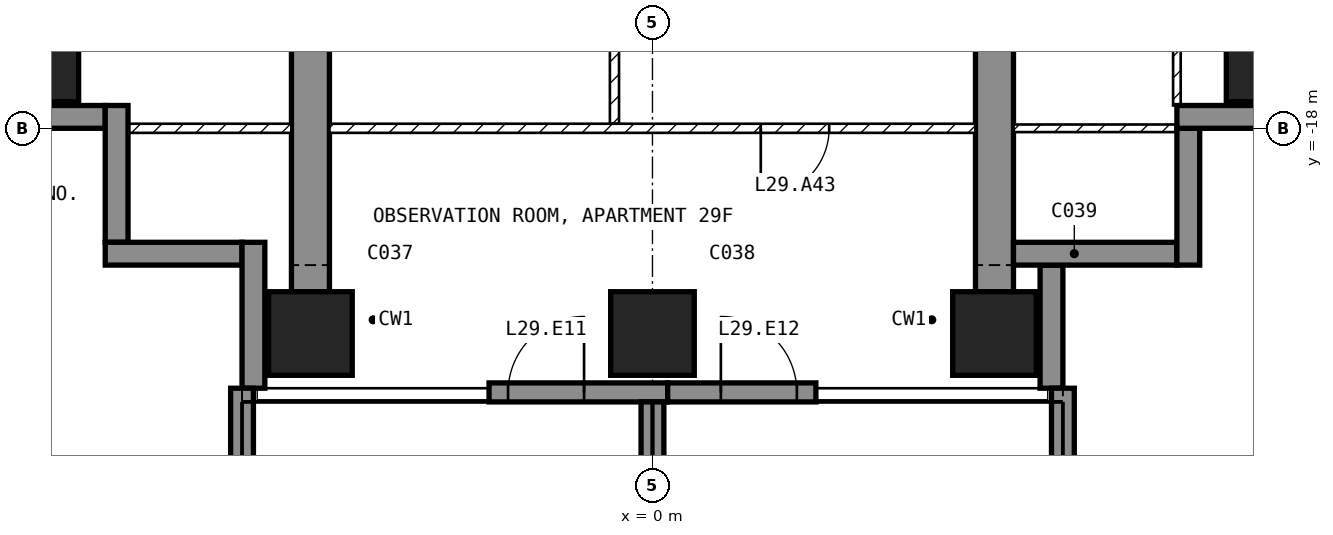
"""IFC4 building model, lengths in metres.
Left out: names, types, materials, properties, quantities, classifications, styles, units other than length and angle.
Written with IfcOpenShell. Run it as: python <this file> out.ifc"""

import sys

from ifc_helpers import new_model, si_unit, direction, frame, frame_2d, origin, origin_2d, place, context, subcontext, project, spatial, polyline, rectangle, outline, extrude, element, fill, save


model = new_model("IFC4")
c1 = context("Model", 3, precision=1e-05, world=origin(), true_north=direction((0.0, 1.0)))
c2 = subcontext(c1, "Body", "Model", "MODEL_VIEW")
j1 = project(units=[si_unit("LENGTHUNIT", "METRE"), si_unit("PLANEANGLEUNIT", "RADIAN")], contexts=[c1])
p1 = place(None, origin())
s1 = spatial("IfcSite", under=j1, at=p1, CompositionType="ELEMENT")
p2 = place(p1, origin())
s2 = spatial("IfcBuilding", under=s1, at=p2, CompositionType="ELEMENT")
p3 = place(p2, frame((0.0, 0.0, 123.4)))
s3 = spatial("IfcBuildingStorey", under=s2, at=p3, CompositionType="ELEMENT", Elevation=123.4)
for number, where, z_axis, x_axis in (
    (1, (-8.1, -17.1, -0.25), (0.0, 0.0, 1.0), (1.0, 0.0, 0.0)),
    (2, (-4.5, -20.7, -0.25), (0.0, 0.0, 1.0), (1.0, 0.0, 0.0)),
    (3, (0.0, -20.7, -0.25), (0.0, 0.0, 1.0), (1.0, 0.0, 0.0)),
    (4, (4.5, -20.7, -0.25), (0.0, 0.0, 1.0), (1.0, 0.0, 0.0)),
    (5, (8.1, -17.1, -0.25), (0.0, 0.0, 1.0), (1.0, 0.0, 0.0)),
):
    element("IfcColumn", number, at=place(p3, frame(where, z_axis=z_axis, x_axis=x_axis)), inside=s3, PredefinedType="COLUMN", context=c2, shape_type="SweptSolid", body=[
        extrude(rectangle(XDim=1.1, YDim=1.1, at=origin_2d()), origin(), (0.0, 0.0, 1.0), 3.5),
    ])
for number, where, z_axis, x_axis in (
    (6, (-4.75, -20.15, -0.25), (1.0, 0.0, 0.0), (0.0, 1.0, 0.0)),
    (7, (4.25, -20.15, -0.25), (1.0, 0.0, 0.0), (0.0, 1.0, 0.0)),
):
    element("IfcWall", number, at=place(p3, frame(where, z_axis=z_axis, x_axis=x_axis)), inside=s3, PredefinedType="SHEAR", context=c2, shape_type="SweptSolid", body=[
        extrude(outline(polyline([(0.0, 0.0), (6.65, 0.0), (6.65, 2.65), (9.05, 2.65), (9.05, 0.0), (11.15, 0.0), (11.15, 3.5), (0.0, 3.5), (0.0, 0.0)])), origin(), (0.0, 0.0, 1.0), 0.5),
    ])
p4 = place(p3, frame((-2.15, -21.475, 0.0), z_axis=(0.0, 0.0, 1.0), x_axis=(1.0, 0.0, 0.0)))
e8 = element("IfcWall", 8, at=p4, inside=s3, PredefinedType="SOLIDWALL", context=c2, shape_type="SweptSolid", body=[
    extrude(rectangle(XDim=2.35, YDim=0.25, at=frame_2d((1.175, 0.0))), origin(), (0.0, 0.0, 1.0), 3.25),
])
p5 = place(p4, frame((0.25, 0.0, 0.0)))
e9 = element("IfcOpeningElement", 9, at=p5, cuts=e8, PredefinedType="OPENING", context=c2, shape_type="SweptSolid", body=[
    extrude(rectangle(XDim=1.0, YDim=2.4, at=frame_2d((0.5, 1.2))), frame((0.0, 0.135, 0.0), z_axis=(0.0, -1.0, 0.0), x_axis=(1.0, 0.0, 0.0)), (0.0, 0.0, 1.0), 0.27),
])
p6 = place(p3, frame((0.2, -21.475, 0.0), z_axis=(0.0, 0.0, 1.0), x_axis=(1.0, 0.0, 0.0)))
e10 = element("IfcWall", 10, at=p6, inside=s3, PredefinedType="SOLIDWALL", context=c2, shape_type="SweptSolid", body=[
    extrude(rectangle(XDim=1.95, YDim=0.25, at=frame_2d((0.975, 0.0))), origin(), (0.0, 0.0, 1.0), 3.25),
])
p7 = place(p6, frame((0.7, 0.0, 0.0)))
e11 = element("IfcOpeningElement", 11, at=p7, cuts=e10, PredefinedType="OPENING", context=c2, shape_type="SweptSolid", body=[
    extrude(rectangle(XDim=1.0, YDim=2.4, at=frame_2d((0.5, 1.2))), frame((0.0, 0.135, 0.0), z_axis=(0.0, -1.0, 0.0), x_axis=(1.0, 0.0, 0.0)), (0.0, 0.0, 1.0), 0.27),
])
p8 = place(p3, frame((5.25, -21.42, 0.0), z_axis=(0.0, 0.0, 1.0), x_axis=(0.0, 1.0, 0.0)))
e12 = element("IfcWall", 12, at=p8, inside=s3, PredefinedType="SOLIDWALL", context=c2, shape_type="SweptSolid", body=[
    extrude(rectangle(XDim=1.62, YDim=0.3, at=frame_2d((0.81, 0.0))), origin(), (0.0, 0.0, 1.0), 3.25),
])
p9 = place(p3, frame((4.75, -19.65, 0.0), z_axis=(0.0, 0.0, 1.0), x_axis=(1.0, 0.0, 0.0)))
e13 = element("IfcWall", 13, at=p9, inside=s3, PredefinedType="SOLIDWALL", context=c2, shape_type="SweptSolid", body=[
    extrude(rectangle(XDim=2.15, YDim=0.3, at=frame_2d((1.075, 0.0))), origin(), (0.0, 0.0, 1.0), 3.25),
])
p10 = place(p3, frame((7.05, -19.8, 0.0), z_axis=(0.0, 0.0, 1.0), x_axis=(0.0, 1.0, 0.0)))
e14 = element("IfcWall", 14, at=p10, inside=s3, PredefinedType="SOLIDWALL", context=c2, shape_type="SweptSolid", body=[
    extrude(rectangle(XDim=1.8, YDim=0.3, at=frame_2d((0.9, 0.0))), origin(), (0.0, 0.0, 1.0), 3.25),
])
p11 = place(p3, frame((6.9, -17.85, 0.0), z_axis=(0.0, 0.0, 1.0), x_axis=(1.0, 0.0, 0.0)))
e15 = element("IfcWall", 15, at=p11, inside=s3, PredefinedType="SOLIDWALL", context=c2, shape_type="SweptSolid", body=[
    extrude(rectangle(XDim=1.85, YDim=0.3, at=frame_2d((0.925, 0.0))), origin(), (0.0, 0.0, 1.0), 3.25),
])
p12 = place(p3, frame((-8.75, -17.85, 0.0), z_axis=(0.0, 0.0, 1.0), x_axis=(1.0, 0.0, 0.0)))
e16 = element("IfcWall", 16, at=p12, inside=s3, PredefinedType="SOLIDWALL", context=c2, shape_type="SweptSolid", body=[
    extrude(rectangle(XDim=1.55, YDim=0.3, at=frame_2d((0.775, 0.0))), origin(), (0.0, 0.0, 1.0), 3.25),
])
for number, where, z_axis, x_axis in (
    (17, (-7.05, -17.7, 0.0), (0.0, 0.0, 1.0), (0.0, -1.0, 0.0)),
    (18, (-7.2, -19.65, 0.0), (0.0, 0.0, 1.0), (1.0, 0.0, 0.0)),
):
    element("IfcWall", number, at=place(p3, frame(where, z_axis=z_axis, x_axis=x_axis)), inside=s3, PredefinedType="SOLIDWALL", context=c2, shape_type="SweptSolid", body=[
        extrude(rectangle(XDim=1.8, YDim=0.3, at=frame_2d((0.9, 0.0))), origin(), (0.0, 0.0, 1.0), 3.25),
    ])
p13 = place(p3, frame((-5.25, -19.5, 0.0), z_axis=(0.0, 0.0, 1.0), x_axis=(0.0, -1.0, 0.0)))
e19 = element("IfcWall", 19, at=p13, inside=s3, PredefinedType="SOLIDWALL", context=c2, shape_type="SweptSolid", body=[
    extrude(rectangle(XDim=1.92, YDim=0.3, at=frame_2d((0.96, 0.0))), origin(), (0.0, 0.0, 1.0), 3.25),
])
p14 = place(p3, frame((-5.4, -21.42, 0.0), z_axis=(0.0, 0.0, 1.0), x_axis=(0.0, -1.0, 0.0)))
e20 = element("IfcWall", 20, at=p14, inside=s3, PredefinedType="SOLIDWALL", context=c2, shape_type="SweptSolid", body=[
    extrude(rectangle(XDim=2.88, YDim=0.3, at=frame_2d((1.44, 0.0))), origin(), (0.0, 0.0, 1.0), 3.25),
])
p15 = place(p3, frame((0.0, -21.6, 0.0), z_axis=(0.0, 0.0, 1.0), x_axis=(0.0, -1.0, 0.0)))
e21 = element("IfcWall", 21, at=p15, inside=s3, PredefinedType="SOLIDWALL", context=c2, shape_type="SweptSolid", body=[
    extrude(rectangle(XDim=2.7, YDim=0.3, at=frame_2d((1.35, 0.0))), origin(), (0.0, 0.0, 1.0), 3.25),
])
p16 = place(p3, frame((5.4, -21.42, 0.0), z_axis=(0.0, 0.0, 1.0), x_axis=(0.0, -1.0, 0.0)))
e22 = element("IfcWall", 22, at=p16, inside=s3, PredefinedType="SOLIDWALL", context=c2, shape_type="SweptSolid", body=[
    extrude(rectangle(XDim=2.88, YDim=0.3, at=frame_2d((1.44, 0.0))), origin(), (0.0, 0.0, 1.0), 3.25),
])
p17 = place(p3, frame((-0.5, -17.94, 0.0), z_axis=(0.0, 0.0, 1.0), x_axis=(0.0, 1.0, 0.0)))
e23 = element("IfcWall", 23, at=p17, inside=s3, PredefinedType="PARTITIONING", context=c2, shape_type="SweptSolid", body=[
    extrude(rectangle(XDim=2.88, YDim=0.12, at=frame_2d((1.44, 0.0))), origin(), (0.0, 0.0, 1.0), 3.25),
])
p18 = place(p17, frame((0.99, 0.0, 0.0)))
e24 = element("IfcOpeningElement", 24, at=p18, cuts=e23, PredefinedType="OPENING", context=c2, shape_type="SweptSolid", body=[
    extrude(rectangle(XDim=0.9, YDim=2.1, at=frame_2d((0.45, 1.05))), frame((0.0, 0.07, 0.0), z_axis=(0.0, -1.0, 0.0), x_axis=(1.0, 0.0, 0.0)), (0.0, 0.0, 1.0), 0.14),
])
p19 = place(p3, frame((4.25, -18.0, 0.0), z_axis=(0.0, 0.0, 1.0), x_axis=(-1.0, 0.0, 0.0)))
e25 = element("IfcWall", 25, at=p19, inside=s3, PredefinedType="PARTITIONING", context=c2, shape_type="SweptSolid", body=[
    extrude(rectangle(XDim=8.5, YDim=0.12, at=frame_2d((4.25, 0.0))), origin(), (0.0, 0.0, 1.0), 3.25),
])
p20 = place(p19, frame((1.925, 0.0, 0.0)))
e26 = element("IfcOpeningElement", 26, at=p20, cuts=e25, PredefinedType="OPENING", context=c2, shape_type="SweptSolid", body=[
    extrude(rectangle(XDim=0.9, YDim=2.1, at=frame_2d((0.45, 1.05))), frame((0.0, 0.07, 0.0), z_axis=(0.0, -1.0, 0.0), x_axis=(1.0, 0.0, 0.0)), (0.0, 0.0, 1.0), 0.14),
])
p21 = place(p3, frame((6.9, -17.7, 0.0), z_axis=(0.0, 0.0, 1.0), x_axis=(0.0, 1.0, 0.0)))
e27 = element("IfcWall", 27, at=p21, inside=s3, PredefinedType="PARTITIONING", context=c2, shape_type="SweptSolid", body=[
    extrude(rectangle(XDim=3.25, YDim=0.1, at=frame_2d((1.625, 0.0))), origin(), (0.0, 0.0, 1.0), 3.25),
])
p22 = place(p21, frame((2.2, 0.0, 0.0)))
e28 = element("IfcOpeningElement", 28, at=p22, cuts=e27, PredefinedType="OPENING", context=c2, shape_type="SweptSolid", body=[
    extrude(rectangle(XDim=0.85, YDim=2.1, at=frame_2d((0.425, 1.05))), frame((0.0, 0.06, 0.0), z_axis=(0.0, -1.0, 0.0), x_axis=(1.0, 0.0, 0.0)), (0.0, 0.0, 1.0), 0.12),
])
p23 = place(p3, frame((7.12, -18.0, 0.0), z_axis=(0.0, 0.0, 1.0), x_axis=(-1.0, 0.0, 0.0)))
e29 = element("IfcWall", 29, at=p23, inside=s3, PredefinedType="PARTITIONING", context=c2, shape_type="SweptSolid", body=[
    extrude(rectangle(XDim=2.37, YDim=0.1, at=frame_2d((1.185, 0.0))), origin(), (0.0, 0.0, 1.0), 3.25),
])
p24 = place(p3, frame((-4.75, -18.0, 0.0), z_axis=(0.0, 0.0, 1.0), x_axis=(-1.0, 0.0, 0.0)))
e30 = element("IfcWall", 30, at=p24, inside=s3, PredefinedType="PARTITIONING", context=c2, shape_type="SweptSolid", body=[
    extrude(rectangle(XDim=2.37, YDim=0.12, at=frame_2d((1.185, 0.0))), origin(), (0.0, 0.0, 1.0), 3.25),
])
p25 = place(p5, origin())
e31 = element("IfcDoor", 31, at=p25, inside=s3, OperationType="SINGLE_SWING_RIGHT", PredefinedType="DOOR", context=c2, shape_type="SweptSolid", body=[
    extrude(rectangle(XDim=1.0, YDim=2.4, at=frame_2d((0.5, 1.2))), frame((0.0, 0.025, 0.0), z_axis=(0.0, -1.0, 0.0), x_axis=(1.0, 0.0, 0.0)), (0.0, 0.0, 1.0), 0.05),
])
fill(e9, e31)
p26 = place(p7, origin())
e32 = element("IfcDoor", 32, at=p26, inside=s3, OperationType="SINGLE_SWING_LEFT", PredefinedType="DOOR", context=c2, shape_type="SweptSolid", body=[
    extrude(rectangle(XDim=1.0, YDim=2.4, at=frame_2d((0.5, 1.2))), frame((0.0, 0.025, 0.0), z_axis=(0.0, -1.0, 0.0), x_axis=(1.0, 0.0, 0.0)), (0.0, 0.0, 1.0), 0.05),
])
fill(e11, e32)
p27 = place(p20, origin())
e33 = element("IfcDoor", 33, at=p27, inside=s3, OperationType="SINGLE_SWING_RIGHT", PredefinedType="DOOR", context=c2, shape_type="SweptSolid", body=[
    extrude(rectangle(XDim=0.9, YDim=2.1, at=frame_2d((0.45, 1.05))), frame((0.0, 0.025, 0.0), z_axis=(0.0, -1.0, 0.0), x_axis=(1.0, 0.0, 0.0)), (0.0, 0.0, 1.0), 0.05),
])
fill(e26, e33)
save(model, sys.argv[1])
